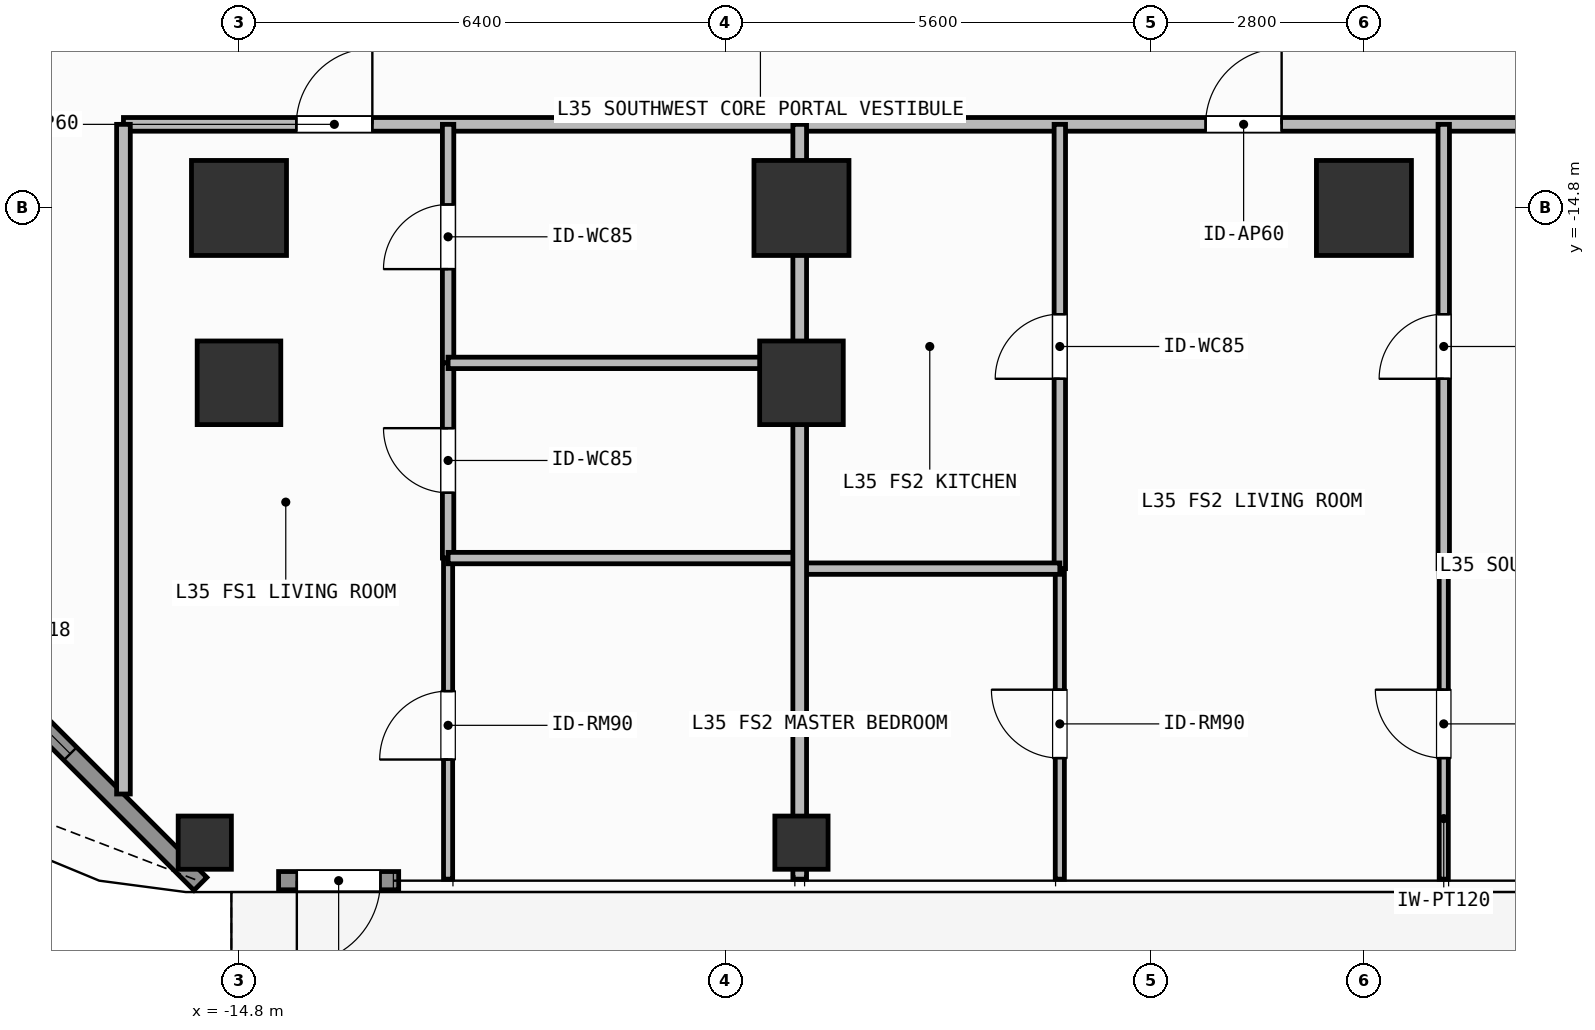
"""IFC4 building model, lengths in metres.
Left out: names, types, materials, properties, quantities, classifications, styles, units other than length and angle.
Written with IfcOpenShell. Run it as: python <this file> out.ifc"""

import sys

from ifc_helpers import new_model, si_unit, direction, frame, frame_2d, origin, origin_2d, place, context, subcontext, project, spatial, rectangle, hollow_rectangle, extrude, element, fill, save


model = new_model("IFC4")
c1 = context("Model", 3, precision=1e-05, world=origin(), true_north=direction((0.0, 1.0)))
c2 = subcontext(c1, "Body", "Model", "MODEL_VIEW")
j1 = project(units=[si_unit("LENGTHUNIT", "METRE"), si_unit("PLANEANGLEUNIT", "RADIAN")], contexts=[c1])
p1 = place(None, origin())
s1 = spatial("IfcSite", under=j1, at=p1, CompositionType="ELEMENT")
p2 = place(p1, origin())
s2 = spatial("IfcBuilding", under=s1, at=p2, CompositionType="ELEMENT")
p3 = place(p2, frame((0.0, 0.0, 140.7)))
s3 = spatial("IfcBuildingStorey", under=s2, at=p3, CompositionType="ELEMENT", Elevation=140.7)
for number, where, z_axis, x_axis in (
    (1, (-14.8, -14.8, 0.0), (0.0, 0.0, 1.0), (1.0, 0.0, 0.0)),
    (2, (-7.4, -14.8, 0.0), (0.0, 0.0, 1.0), (1.0, 0.0, 0.0)),
    (3, (0.0, -14.8, 0.0), (0.0, 0.0, 1.0), (1.0, 0.0, 0.0)),
):
    element("IfcColumn", number, at=place(p3, frame(where, z_axis=z_axis, x_axis=x_axis)), inside=s3, PredefinedType="COLUMN", context=c2, shape_type="SweptSolid", body=[
        extrude(rectangle(XDim=1.25, YDim=1.25, at=origin_2d()), origin(), (0.0, 0.0, 1.0), 3.9),
    ])
for number, where, z_axis, x_axis in (
    (4, (-14.8, -17.1, 0.0), (0.0, 0.0, 1.0), (1.0, 0.0, 0.0)),
    (5, (-7.4, -17.1, 0.0), (0.0, 0.0, 1.0), (1.0, 0.0, 0.0)),
):
    element("IfcColumn", number, at=place(p3, frame(where, z_axis=z_axis, x_axis=x_axis)), inside=s3, PredefinedType="COLUMN", context=c2, shape_type="SweptSolid", body=[
        extrude(rectangle(XDim=1.1, YDim=1.1, at=origin_2d()), origin(), (0.0, 0.0, 1.0), 3.9),
    ])
for number, where, z_axis, x_axis in (
    (6, (-15.25, -23.15, 0.0), (0.0, 0.0, 1.0), (1.0, 0.0, 0.0)),
    (7, (-7.4, -23.15, 0.0), (0.0, 0.0, 1.0), (1.0, 0.0, 0.0)),
):
    element("IfcColumn", number, at=place(p3, frame(where, z_axis=z_axis, x_axis=x_axis)), inside=s3, PredefinedType="COLUMN", context=c2, shape_type="SweptSolid", body=[
        extrude(hollow_rectangle(XDim=0.7, YDim=0.7, WallThickness=0.032, at=origin_2d()), origin(), (0.0, 0.0, 1.0), 3.9),
    ])
p4 = place(p3, frame((-12.699, -23.65, 0.0), z_axis=(0.0, 0.0, 1.0), x_axis=(-1.0, 0.0, 0.0)))
e8 = element("IfcWall", 8, at=p4, inside=s3, PredefinedType="SOLIDWALL", context=c2, shape_type="SweptSolid", body=[
    extrude(rectangle(XDim=1.58, YDim=0.24, at=frame_2d((0.79, 0.0))), origin(), (0.0, 0.0, 1.0), 3.68),
])
p5 = place(p4, frame((0.24, 0.0, 0.0)))
e9 = element("IfcOpeningElement", 9, at=p5, cuts=e8, PredefinedType="OPENING", context=c2, shape_type="SweptSolid", body=[
    extrude(rectangle(XDim=1.1, YDim=2.2, at=frame_2d((0.55, 1.1))), frame((0.0, 0.13, 0.0), z_axis=(0.0, -1.0, 0.0), x_axis=(1.0, 0.0, 0.0)), (0.0, 0.0, 1.0), 0.26),
])
p6 = place(p3, frame((-15.308, -23.692, 0.0), z_axis=(0.0, 0.0, 1.0), x_axis=(-0.707106781187, 0.707106781187, 0.0)))
e10 = element("IfcWall", 10, at=p6, inside=s3, PredefinedType="SOLIDWALL", context=c2, shape_type="SweptSolid", body=[
    extrude(rectangle(XDim=6.343, YDim=0.24, at=frame_2d((3.171, 0.0))), origin(), (0.0, 0.0, 1.0), 3.68),
])
p7 = place(p6, frame((2.421, 0.0, 0.8)))
e11 = element("IfcOpeningElement", 11, at=p7, cuts=e10, PredefinedType="OPENING", context=c2, shape_type="SweptSolid", body=[
    extrude(rectangle(XDim=1.5, YDim=1.85, at=frame_2d((0.75, 0.925))), frame((0.0, 0.13, 0.0), z_axis=(0.0, -1.0, 0.0), x_axis=(1.0, 0.0, 0.0)), (0.0, 0.0, 1.0), 0.26),
])
p8 = place(p3, frame((-16.32, -13.7, 0.0), z_axis=(0.0, 0.0, 1.0), x_axis=(1.0, 0.0, 0.0)))
e12 = element("IfcWall", 12, at=p8, inside=s3, PredefinedType="PARTITIONING", context=c2, shape_type="SweptSolid", body=[
    extrude(rectangle(XDim=8.897, YDim=0.18, at=frame_2d((4.448, 0.0))), origin(), (0.0, 0.0, 1.0), 3.68),
])
p9 = place(p8, frame((2.274, 0.0, 0.0)))
e13 = element("IfcOpeningElement", 13, at=p9, cuts=e12, PredefinedType="OPENING", context=c2, shape_type="SweptSolid", body=[
    extrude(rectangle(XDim=1.0, YDim=2.2, at=frame_2d((0.5, 1.1))), frame((0.0, 0.1, 0.0), z_axis=(0.0, -1.0, 0.0), x_axis=(1.0, 0.0, 0.0)), (0.0, 0.0, 1.0), 0.2),
])
p10 = place(p3, frame((-12.049, -16.838, 0.0), z_axis=(0.0, 0.0, 1.0), x_axis=(0.0, 1.0, 0.0)))
e14 = element("IfcWall", 14, at=p10, inside=s3, PredefinedType="PARTITIONING", context=c2, shape_type="SweptSolid", body=[
    extrude(rectangle(XDim=3.138, YDim=0.15, at=frame_2d((1.569, 0.0))), origin(), (0.0, 0.0, 1.0), 3.68),
])
p11 = place(p10, frame((1.233, 0.0, 0.0)))
e15 = element("IfcOpeningElement", 15, at=p11, cuts=e14, PredefinedType="OPENING", context=c2, shape_type="SweptSolid", body=[
    extrude(rectangle(XDim=0.85, YDim=2.1, at=frame_2d((0.425, 1.05))), frame((0.0, 0.085, 0.0), z_axis=(0.0, -1.0, 0.0), x_axis=(1.0, 0.0, 0.0)), (0.0, 0.0, 1.0), 0.17),
])
p12 = place(p3, frame((-12.049, -19.406, 0.0), z_axis=(0.0, 0.0, 1.0), x_axis=(0.0, 1.0, 0.0)))
e16 = element("IfcWall", 16, at=p12, inside=s3, PredefinedType="PARTITIONING", context=c2, shape_type="SweptSolid", body=[
    extrude(rectangle(XDim=2.568, YDim=0.15, at=frame_2d((1.284, 0.0))), origin(), (0.0, 0.0, 1.0), 3.68),
])
p13 = place(p12, frame((0.859, 0.0, 0.0)))
e17 = element("IfcOpeningElement", 17, at=p13, cuts=e16, PredefinedType="OPENING", context=c2, shape_type="SweptSolid", body=[
    extrude(rectangle(XDim=0.85, YDim=2.1, at=frame_2d((0.425, 1.05))), frame((0.0, 0.085, 0.0), z_axis=(0.0, -1.0, 0.0), x_axis=(1.0, 0.0, 0.0)), (0.0, 0.0, 1.0), 0.17),
])
p14 = place(p3, frame((-12.049, -23.63, 0.0), z_axis=(0.0, 0.0, 1.0), x_axis=(0.0, 1.0, 0.0)))
e18 = element("IfcWall", 18, at=p14, inside=s3, PredefinedType="PARTITIONING", context=c2, shape_type="SweptSolid", body=[
    extrude(rectangle(XDim=4.224, YDim=0.12, at=frame_2d((2.112, 0.0))), origin(), (0.0, 0.0, 1.0), 3.68),
])
p15 = place(p14, frame((1.573, 0.0, 0.0)))
e19 = element("IfcOpeningElement", 19, at=p15, cuts=e18, PredefinedType="OPENING", context=c2, shape_type="SweptSolid", body=[
    extrude(rectangle(XDim=0.9, YDim=2.1, at=frame_2d((0.45, 1.05))), frame((0.0, 0.07, 0.0), z_axis=(0.0, -1.0, 0.0), x_axis=(1.0, 0.0, 0.0)), (0.0, 0.0, 1.0), 0.14),
])
p16 = place(p3, frame((-7.423, -13.7, 0.0), z_axis=(0.0, 0.0, 1.0), x_axis=(1.0, 0.0, 0.0)))
e20 = element("IfcWall", 20, at=p16, inside=s3, PredefinedType="PARTITIONING", context=c2, shape_type="SweptSolid", body=[
    extrude(rectangle(XDim=11.323, YDim=0.18, at=frame_2d((5.662, 0.0))), origin(), (0.0, 0.0, 1.0), 3.68),
])
p17 = place(p16, frame((5.34, 0.0, 0.0)))
e21 = element("IfcOpeningElement", 21, at=p17, cuts=e20, PredefinedType="OPENING", context=c2, shape_type="SweptSolid", body=[
    extrude(rectangle(XDim=1.0, YDim=2.2, at=frame_2d((0.5, 1.1))), frame((0.0, 0.1, 0.0), z_axis=(0.0, -1.0, 0.0), x_axis=(1.0, 0.0, 0.0)), (0.0, 0.0, 1.0), 0.2),
])
p18 = place(p3, frame((-4.001, -19.545, 0.0), z_axis=(0.0, 0.0, 1.0), x_axis=(0.0, 1.0, 0.0)))
e22 = element("IfcWall", 22, at=p18, inside=s3, PredefinedType="PARTITIONING", context=c2, shape_type="SweptSolid", body=[
    extrude(rectangle(XDim=5.845, YDim=0.15, at=frame_2d((2.922, 0.0))), origin(), (0.0, 0.0, 1.0), 3.68),
])
p19 = place(p18, frame((2.498, 0.0, 0.0)))
e23 = element("IfcOpeningElement", 23, at=p19, cuts=e22, PredefinedType="OPENING", context=c2, shape_type="SweptSolid", body=[
    extrude(rectangle(XDim=0.85, YDim=2.1, at=frame_2d((0.425, 1.05))), frame((0.0, 0.085, 0.0), z_axis=(0.0, -1.0, 0.0), x_axis=(1.0, 0.0, 0.0)), (0.0, 0.0, 1.0), 0.17),
])
p20 = place(p3, frame((-4.001, -23.63, 0.0), z_axis=(0.0, 0.0, 1.0), x_axis=(0.0, 1.0, 0.0)))
e24 = element("IfcWall", 24, at=p20, inside=s3, PredefinedType="PARTITIONING", context=c2, shape_type="SweptSolid", body=[
    extrude(rectangle(XDim=4.085, YDim=0.12, at=frame_2d((2.042, 0.0))), origin(), (0.0, 0.0, 1.0), 3.68),
])
p21 = place(p20, frame((1.593, 0.0, 0.0)))
e25 = element("IfcOpeningElement", 25, at=p21, cuts=e24, PredefinedType="OPENING", context=c2, shape_type="SweptSolid", body=[
    extrude(rectangle(XDim=0.9, YDim=2.1, at=frame_2d((0.45, 1.05))), frame((0.0, 0.07, 0.0), z_axis=(0.0, -1.0, 0.0), x_axis=(1.0, 0.0, 0.0)), (0.0, 0.0, 1.0), 0.14),
])
p22 = place(p3, frame((1.05, -19.545, 0.0), z_axis=(0.0, 0.0, 1.0), x_axis=(0.0, 1.0, 0.0)))
e26 = element("IfcWall", 26, at=p22, inside=s3, PredefinedType="PARTITIONING", context=c2, shape_type="SweptSolid", body=[
    extrude(rectangle(XDim=5.845, YDim=0.15, at=frame_2d((2.922, 0.0))), origin(), (0.0, 0.0, 1.0), 3.68),
])
p23 = place(p22, frame((2.498, 0.0, 0.0)))
e27 = element("IfcOpeningElement", 27, at=p23, cuts=e26, PredefinedType="OPENING", context=c2, shape_type="SweptSolid", body=[
    extrude(rectangle(XDim=0.85, YDim=2.1, at=frame_2d((0.425, 1.05))), frame((0.0, 0.085, 0.0), z_axis=(0.0, -1.0, 0.0), x_axis=(1.0, 0.0, 0.0)), (0.0, 0.0, 1.0), 0.17),
])
p24 = place(p3, frame((1.05, -23.63, 0.0), z_axis=(0.0, 0.0, 1.0), x_axis=(0.0, 1.0, 0.0)))
e28 = element("IfcWall", 28, at=p24, inside=s3, PredefinedType="PARTITIONING", context=c2, shape_type="SweptSolid", body=[
    extrude(rectangle(XDim=4.085, YDim=0.12, at=frame_2d((2.042, 0.0))), origin(), (0.0, 0.0, 1.0), 3.68),
])
p25 = place(p24, frame((1.593, 0.0, 0.0)))
e29 = element("IfcOpeningElement", 29, at=p25, cuts=e28, PredefinedType="OPENING", context=c2, shape_type="SweptSolid", body=[
    extrude(rectangle(XDim=0.9, YDim=2.1, at=frame_2d((0.45, 1.05))), frame((0.0, 0.07, 0.0), z_axis=(0.0, -1.0, 0.0), x_axis=(1.0, 0.0, 0.0)), (0.0, 0.0, 1.0), 0.14),
])
p26 = place(p3, frame((-16.32, -22.51, 0.0), z_axis=(0.0, 0.0, 1.0), x_axis=(0.0, 1.0, 0.0)))
e30 = element("IfcWall", 30, at=p26, inside=s3, PredefinedType="PARTITIONING", context=c2, shape_type="SweptSolid", body=[
    extrude(rectangle(XDim=8.81, YDim=0.18, at=frame_2d((4.405, 0.0))), origin(), (0.0, 0.0, 1.0), 3.68),
])
p27 = place(p3, frame((-12.049, -16.838, 0.0), z_axis=(0.0, 0.0, 1.0), x_axis=(1.0, 0.0, 0.0)))
e31 = element("IfcWall", 31, at=p27, inside=s3, PredefinedType="PARTITIONING", context=c2, shape_type="SweptSolid", body=[
    extrude(rectangle(XDim=4.626, YDim=0.15, at=frame_2d((2.313, 0.0))), origin(), (0.0, 0.0, 1.0), 3.082),
])
p28 = place(p3, frame((-12.049, -19.406, 0.0), z_axis=(0.0, 0.0, 1.0), x_axis=(1.0, 0.0, 0.0)))
e32 = element("IfcWall", 32, at=p28, inside=s3, PredefinedType="PARTITIONING", context=c2, shape_type="SweptSolid", body=[
    extrude(rectangle(XDim=4.626, YDim=0.15, at=frame_2d((2.313, 0.0))), origin(), (0.0, 0.0, 1.0), 3.68),
])
p29 = place(p3, frame((-7.423, -19.545, 0.0), z_axis=(0.0, 0.0, 1.0), x_axis=(1.0, 0.0, 0.0)))
e33 = element("IfcWall", 33, at=p29, inside=s3, PredefinedType="PARTITIONING", context=c2, shape_type="SweptSolid", body=[
    extrude(rectangle(XDim=3.422, YDim=0.15, at=frame_2d((1.711, 0.0))), origin(), (0.0, 0.0, 1.0), 3.68),
])
p30 = place(p3, frame((1.05, -19.545, 0.0), z_axis=(0.0, 0.0, 1.0), x_axis=(1.0, 0.0, 0.0)))
e34 = element("IfcWall", 34, at=p30, inside=s3, PredefinedType="PARTITIONING", context=c2, shape_type="SweptSolid", body=[
    extrude(rectangle(XDim=2.85, YDim=0.15, at=frame_2d((1.425, 0.0))), origin(), (0.0, 0.0, 1.0), 3.68),
])
p31 = place(p3, frame((-7.423, -23.63, 0.0), z_axis=(0.0, 0.0, 1.0), x_axis=(0.0, 1.0, 0.0)))
e35 = element("IfcWall", 35, at=p31, inside=s3, PredefinedType="PARTITIONING", context=c2, shape_type="SweptSolid", body=[
    extrude(rectangle(XDim=9.93, YDim=0.18, at=frame_2d((4.965, 0.0))), origin(), (0.0, 0.0, 1.0), 3.082),
])
p32 = place(p5, origin())
e36 = element("IfcDoor", 36, at=p32, inside=s3, OperationType="SINGLE_SWING_RIGHT", PredefinedType="DOOR", context=c2, shape_type="SweptSolid", body=[
    extrude(rectangle(XDim=1.1, YDim=2.2, at=frame_2d((0.55, 1.1))), frame((0.0, 0.025, 0.0), z_axis=(0.0, -1.0, 0.0), x_axis=(1.0, 0.0, 0.0)), (0.0, 0.0, 1.0), 0.05),
])
fill(e9, e36)
p33 = place(p7, origin())
e37 = element("IfcWindow", 37, at=p33, inside=s3, PartitioningType="SINGLE_PANEL", PredefinedType="WINDOW", context=c2, shape_type="SweptSolid", body=[
    extrude(rectangle(XDim=1.5, YDim=1.85, at=frame_2d((0.75, 0.925))), frame((0.0, 0.03, 0.0), z_axis=(0.0, -1.0, 0.0), x_axis=(1.0, 0.0, 0.0)), (0.0, 0.0, 1.0), 0.06),
])
fill(e11, e37)
p34 = place(p9, origin())
e38 = element("IfcDoor", 38, at=p34, inside=s3, OperationType="SINGLE_SWING_RIGHT", PredefinedType="DOOR", context=c2, shape_type="SweptSolid", body=[
    extrude(rectangle(XDim=1.0, YDim=2.2, at=frame_2d((0.5, 1.1))), frame((0.0, 0.025, 0.0), z_axis=(0.0, -1.0, 0.0), x_axis=(1.0, 0.0, 0.0)), (0.0, 0.0, 1.0), 0.05),
])
fill(e13, e38)
p35 = place(p11, origin())
e39 = element("IfcDoor", 39, at=p35, inside=s3, OperationType="SINGLE_SWING_LEFT", PredefinedType="DOOR", context=c2, shape_type="SweptSolid", body=[
    extrude(rectangle(XDim=0.85, YDim=2.1, at=frame_2d((0.425, 1.05))), frame((0.0, 0.025, 0.0), z_axis=(0.0, -1.0, 0.0), x_axis=(1.0, 0.0, 0.0)), (0.0, 0.0, 1.0), 0.05),
])
fill(e15, e39)
p36 = place(p13, origin())
e40 = element("IfcDoor", 40, at=p36, inside=s3, OperationType="SINGLE_SWING_RIGHT", PredefinedType="DOOR", context=c2, shape_type="SweptSolid", body=[
    extrude(rectangle(XDim=0.85, YDim=2.1, at=frame_2d((0.425, 1.05))), frame((0.0, 0.025, 0.0), z_axis=(0.0, -1.0, 0.0), x_axis=(1.0, 0.0, 0.0)), (0.0, 0.0, 1.0), 0.05),
])
fill(e17, e40)
p37 = place(p15, origin())
e41 = element("IfcDoor", 41, at=p37, inside=s3, OperationType="SINGLE_SWING_LEFT", PredefinedType="DOOR", context=c2, shape_type="SweptSolid", body=[
    extrude(rectangle(XDim=0.9, YDim=2.1, at=frame_2d((0.45, 1.05))), frame((0.0, 0.025, 0.0), z_axis=(0.0, -1.0, 0.0), x_axis=(1.0, 0.0, 0.0)), (0.0, 0.0, 1.0), 0.05),
])
fill(e19, e41)
p38 = place(p17, origin())
e42 = element("IfcDoor", 42, at=p38, inside=s3, OperationType="SINGLE_SWING_RIGHT", PredefinedType="DOOR", context=c2, shape_type="SweptSolid", body=[
    extrude(rectangle(XDim=1.0, YDim=2.2, at=frame_2d((0.5, 1.1))), frame((0.0, 0.025, 0.0), z_axis=(0.0, -1.0, 0.0), x_axis=(1.0, 0.0, 0.0)), (0.0, 0.0, 1.0), 0.05),
])
fill(e21, e42)
p39 = place(p19, origin())
e43 = element("IfcDoor", 43, at=p39, inside=s3, OperationType="SINGLE_SWING_LEFT", PredefinedType="DOOR", context=c2, shape_type="SweptSolid", body=[
    extrude(rectangle(XDim=0.85, YDim=2.1, at=frame_2d((0.425, 1.05))), frame((0.0, 0.025, 0.0), z_axis=(0.0, -1.0, 0.0), x_axis=(1.0, 0.0, 0.0)), (0.0, 0.0, 1.0), 0.05),
])
fill(e23, e43)
p40 = place(p21, origin())
e44 = element("IfcDoor", 44, at=p40, inside=s3, OperationType="SINGLE_SWING_RIGHT", PredefinedType="DOOR", context=c2, shape_type="SweptSolid", body=[
    extrude(rectangle(XDim=0.9, YDim=2.1, at=frame_2d((0.45, 1.05))), frame((0.0, 0.025, 0.0), z_axis=(0.0, -1.0, 0.0), x_axis=(1.0, 0.0, 0.0)), (0.0, 0.0, 1.0), 0.05),
])
fill(e25, e44)
p41 = place(p23, origin())
e45 = element("IfcDoor", 45, at=p41, inside=s3, OperationType="SINGLE_SWING_LEFT", PredefinedType="DOOR", context=c2, shape_type="SweptSolid", body=[
    extrude(rectangle(XDim=0.85, YDim=2.1, at=frame_2d((0.425, 1.05))), frame((0.0, 0.025, 0.0), z_axis=(0.0, -1.0, 0.0), x_axis=(1.0, 0.0, 0.0)), (0.0, 0.0, 1.0), 0.05),
])
fill(e27, e45)
p42 = place(p25, origin())
e46 = element("IfcDoor", 46, at=p42, inside=s3, OperationType="SINGLE_SWING_RIGHT", PredefinedType="DOOR", context=c2, shape_type="SweptSolid", body=[
    extrude(rectangle(XDim=0.9, YDim=2.1, at=frame_2d((0.45, 1.05))), frame((0.0, 0.025, 0.0), z_axis=(0.0, -1.0, 0.0), x_axis=(1.0, 0.0, 0.0)), (0.0, 0.0, 1.0), 0.05),
])
fill(e29, e46)
save(model, sys.argv[1])
